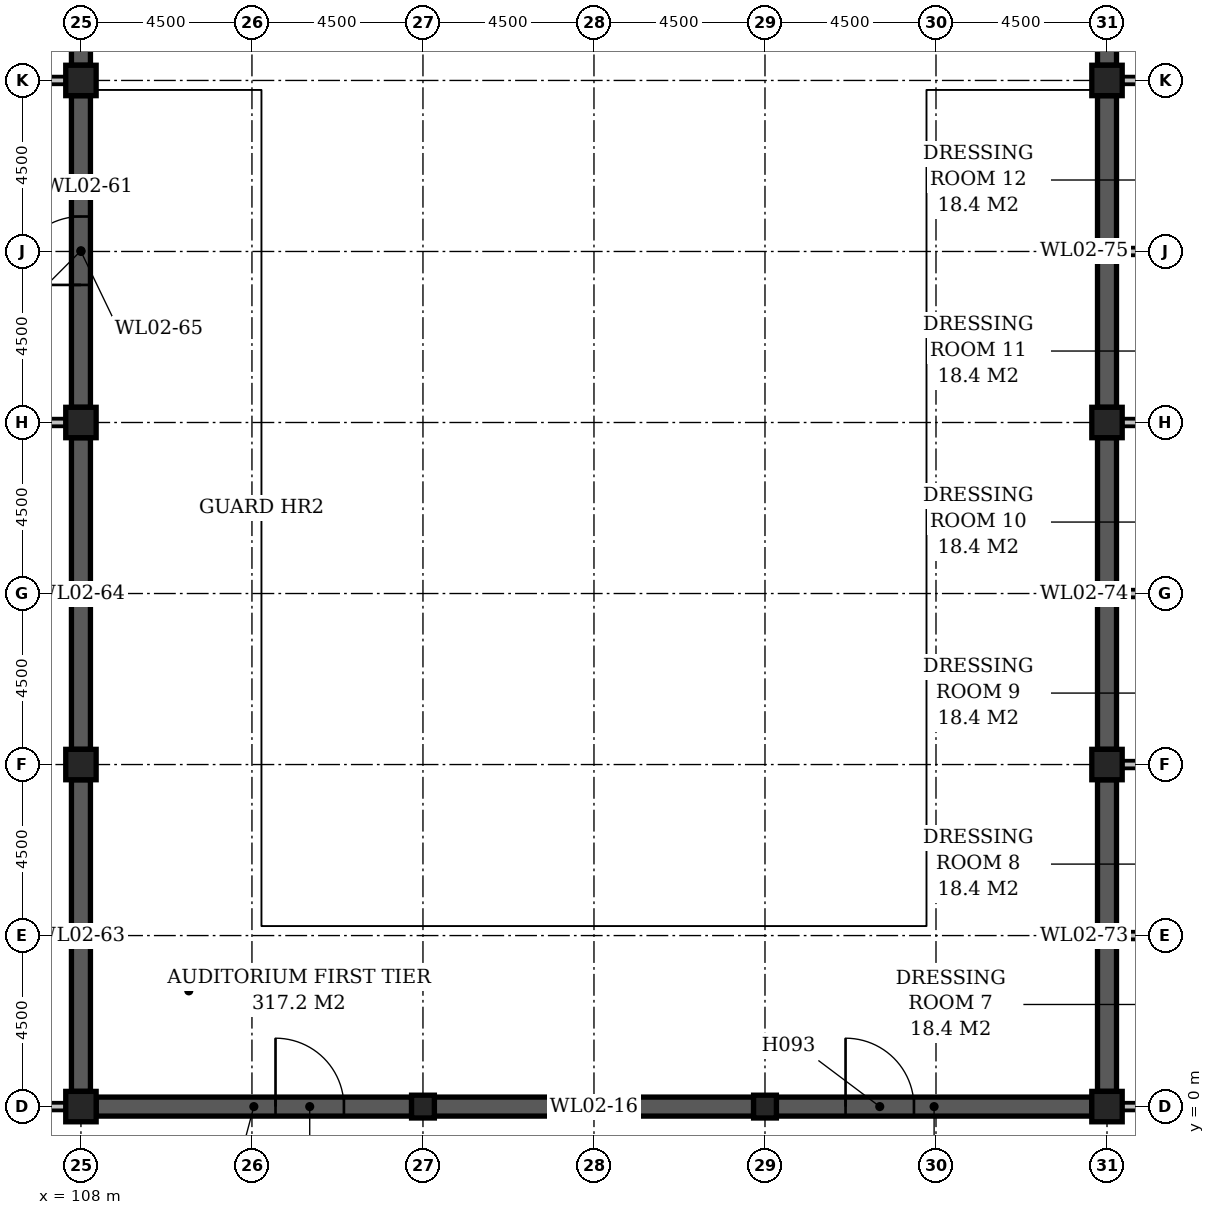
"""IFC4 building model, lengths in metres.
Left out: names, types, materials, properties, quantities, classifications, styles, units other than length and angle.
Written with IfcOpenShell. Run it as: python <this file> out.ifc"""

import sys

from ifc_helpers import new_model, si_unit, direction, frame, frame_2d, origin, origin_2d, place, context, subcontext, project, spatial, rectangle, extrude, element, fill, save


model = new_model("IFC4")
c1 = context("Model", 3, precision=1e-05, world=origin(), true_north=direction((0.0, 1.0)))
c2 = subcontext(c1, "Body", "Model", "MODEL_VIEW")
j1 = project(units=[si_unit("LENGTHUNIT", "METRE"), si_unit("PLANEANGLEUNIT", "RADIAN")], contexts=[c1])
p1 = place(None, origin())
s1 = spatial("IfcSite", under=j1, at=p1, CompositionType="ELEMENT")
p2 = place(p1, origin())
s2 = spatial("IfcBuilding", under=s1, at=p2, CompositionType="ELEMENT")
p3 = place(p2, frame((0.0, 0.0, 14.0)))
s3 = spatial("IfcBuildingStorey", under=s2, at=p3, CompositionType="ELEMENT", Elevation=14.0)
for number, where, z_axis, x_axis in (
    (1, (108.0, 0.0, -0.3), (0.0, 0.0, 1.0), (1.0, 0.0, 0.0)),
    (2, (108.0, 9.0, -0.3), (0.0, 0.0, 1.0), (1.0, 0.0, 0.0)),
    (3, (108.0, 18.0, -0.3), (0.0, 0.0, 1.0), (1.0, 0.0, 0.0)),
    (4, (108.0, 27.0, -0.3), (0.0, 0.0, 1.0), (1.0, 0.0, 0.0)),
):
    element("IfcColumn", number, at=place(p3, frame(where, z_axis=z_axis, x_axis=x_axis)), inside=s3, PredefinedType="COLUMN", context=c2, shape_type="SweptSolid", body=[
        extrude(rectangle(XDim=0.8, YDim=0.8, at=origin_2d()), origin(), (0.0, 0.0, 1.0), 5.0),
    ])
for number, where, z_axis, x_axis in (
    (5, (117.0, 0.0, -0.3), (0.0, 0.0, 1.0), (1.0, 0.0, 0.0)),
    (6, (126.0, 0.0, -0.3), (0.0, 0.0, 1.0), (1.0, 0.0, 0.0)),
):
    element("IfcColumn", number, at=place(p3, frame(where, z_axis=z_axis, x_axis=x_axis)), inside=s3, PredefinedType="COLUMN", context=c2, shape_type="SweptSolid", body=[
        extrude(rectangle(XDim=0.6, YDim=0.6, at=origin_2d()), origin(), (0.0, 0.0, 1.0), 5.0),
    ])
for number, where, z_axis, x_axis in (
    (7, (135.0, 0.0, -0.3), (0.0, 0.0, 1.0), (1.0, 0.0, 0.0)),
    (8, (135.0, 9.0, -0.3), (0.0, 0.0, 1.0), (1.0, 0.0, 0.0)),
    (9, (135.0, 18.0, -0.3), (0.0, 0.0, 1.0), (1.0, 0.0, 0.0)),
    (10, (135.0, 27.0, -0.3), (0.0, 0.0, 1.0), (1.0, 0.0, 0.0)),
):
    element("IfcColumn", number, at=place(p3, frame(where, z_axis=z_axis, x_axis=x_axis)), inside=s3, PredefinedType="COLUMN", context=c2, shape_type="SweptSolid", body=[
        extrude(rectangle(XDim=0.8, YDim=0.8, at=origin_2d()), origin(), (0.0, 0.0, 1.0), 5.0),
    ])
p4 = place(p3, frame((99.3, 0.0, 0.0), z_axis=(0.0, 0.0, 1.0), x_axis=(1.0, 0.0, 0.0)))
e11 = element("IfcWall", 11, at=p4, inside=s3, PredefinedType="STANDARD", context=c2, shape_type="SweptSolid", body=[
    extrude(rectangle(XDim=8.3, YDim=0.2, at=frame_2d((4.15, 0.0))), origin(), (0.0, 0.0, 1.0), 4.7),
])
p5 = place(p3, frame((108.4, 0.0, 0.0), z_axis=(0.0, 0.0, 1.0), x_axis=(1.0, 0.0, 0.0)))
e12 = element("IfcWall", 12, at=p5, inside=s3, PredefinedType="STANDARD", context=c2, shape_type="SweptSolid", body=[
    extrude(rectangle(XDim=8.3, YDim=0.5, at=frame_2d((4.15, 0.0))), origin(), (0.0, 0.0, 1.0), 5.0),
])
p6 = place(p5, frame((4.72, 0.0, 0.0)))
e13 = element("IfcOpeningElement", 13, at=p6, cuts=e12, PredefinedType="OPENING", context=c2, shape_type="SweptSolid", body=[
    extrude(rectangle(XDim=1.8, YDim=2.4, at=frame_2d((0.9, 1.2))), frame((0.0, 0.262, 0.0), z_axis=(0.0, -1.0, 0.0), x_axis=(1.0, 0.0, 0.0)), (0.0, 0.0, 1.0), 0.524),
])
p7 = place(p3, frame((117.3, 0.0, 0.0), z_axis=(0.0, 0.0, 1.0), x_axis=(1.0, 0.0, 0.0)))
e14 = element("IfcWall", 14, at=p7, inside=s3, PredefinedType="STANDARD", context=c2, shape_type="SweptSolid", body=[
    extrude(rectangle(XDim=8.4, YDim=0.5, at=frame_2d((4.2, 0.0))), origin(), (0.0, 0.0, 1.0), 5.0),
])
p8 = place(p3, frame((126.3, 0.0, 0.0), z_axis=(0.0, 0.0, 1.0), x_axis=(1.0, 0.0, 0.0)))
e15 = element("IfcWall", 15, at=p8, inside=s3, PredefinedType="STANDARD", context=c2, shape_type="SweptSolid", body=[
    extrude(rectangle(XDim=8.3, YDim=0.5, at=frame_2d((4.15, 0.0))), origin(), (0.0, 0.0, 1.0), 5.0),
])
p9 = place(p8, frame((1.82, 0.0, 0.0)))
e16 = element("IfcOpeningElement", 16, at=p9, cuts=e15, PredefinedType="OPENING", context=c2, shape_type="SweptSolid", body=[
    extrude(rectangle(XDim=1.8, YDim=2.4, at=frame_2d((0.9, 1.2))), frame((0.0, 0.262, 0.0), z_axis=(0.0, -1.0, 0.0), x_axis=(1.0, 0.0, 0.0)), (0.0, 0.0, 1.0), 0.524),
])
p10 = place(p3, frame((135.4, 0.0, 0.0), z_axis=(0.0, 0.0, 1.0), x_axis=(1.0, 0.0, 0.0)))
e17 = element("IfcWall", 17, at=p10, inside=s3, PredefinedType="STANDARD", context=c2, shape_type="SweptSolid", body=[
    extrude(rectangle(XDim=8.3, YDim=0.2, at=frame_2d((4.15, 0.0))), origin(), (0.0, 0.0, 1.0), 4.7),
])
p11 = place(p10, frame((5.77, 0.0, 0.0)))
e18 = element("IfcOpeningElement", 18, at=p11, cuts=e17, PredefinedType="OPENING", context=c2, shape_type="SweptSolid", body=[
    extrude(rectangle(XDim=1.2, YDim=2.1, at=frame_2d((0.6, 1.05))), frame((0.0, 0.112, 0.0), z_axis=(0.0, -1.0, 0.0), x_axis=(1.0, 0.0, 0.0)), (0.0, 0.0, 1.0), 0.224),
])
p12 = place(p10, frame((1.37, 0.0, 0.0)))
e19 = element("IfcOpeningElement", 19, at=p12, cuts=e17, PredefinedType="OPENING", context=c2, shape_type="SweptSolid", body=[
    extrude(rectangle(XDim=1.0, YDim=2.1, at=frame_2d((0.5, 1.05))), frame((0.0, 0.112, 0.0), z_axis=(0.0, -1.0, 0.0), x_axis=(1.0, 0.0, 0.0)), (0.0, 0.0, 1.0), 0.224),
])
p13 = place(p3, frame((135.25, 4.5, 0.0), z_axis=(0.0, 0.0, 1.0), x_axis=(1.0, 0.0, 0.0)))
e20 = element("IfcWall", 20, at=p13, inside=s3, PredefinedType="STANDARD", context=c2, shape_type="SweptSolid", body=[
    extrude(rectangle(XDim=4.15, YDim=0.2, at=frame_2d((2.075, 0.0))), origin(), (0.0, 0.0, 1.0), 4.7),
])
p14 = place(p3, frame((135.4, 9.0, 0.0), z_axis=(0.0, 0.0, 1.0), x_axis=(1.0, 0.0, 0.0)))
e21 = element("IfcWall", 21, at=p14, inside=s3, PredefinedType="STANDARD", context=c2, shape_type="SweptSolid", body=[
    extrude(rectangle(XDim=4.0, YDim=0.2, at=frame_2d((2.0, 0.0))), origin(), (0.0, 0.0, 1.0), 4.7),
])
p15 = place(p3, frame((135.25, 13.5, 0.0), z_axis=(0.0, 0.0, 1.0), x_axis=(1.0, 0.0, 0.0)))
e22 = element("IfcWall", 22, at=p15, inside=s3, PredefinedType="STANDARD", context=c2, shape_type="SweptSolid", body=[
    extrude(rectangle(XDim=4.15, YDim=0.2, at=frame_2d((2.075, 0.0))), origin(), (0.0, 0.0, 1.0), 4.7),
])
p16 = place(p3, frame((94.5, 18.0, 0.0), z_axis=(0.0, 0.0, 1.0), x_axis=(1.0, 0.0, 0.0)))
e23 = element("IfcWall", 23, at=p16, inside=s3, PredefinedType="STANDARD", context=c2, shape_type="SweptSolid", body=[
    extrude(rectangle(XDim=13.1, YDim=0.2, at=frame_2d((6.55, 0.0))), origin(), (0.0, 0.0, 1.0), 3.3),
])
p17 = place(p16, frame((6.17, 0.0, 0.0)))
e24 = element("IfcOpeningElement", 24, at=p17, cuts=e23, PredefinedType="OPENING", context=c2, shape_type="SweptSolid", body=[
    extrude(rectangle(XDim=1.2, YDim=2.1, at=frame_2d((0.6, 1.05))), frame((0.0, 0.112, 0.0), z_axis=(0.0, -1.0, 0.0), x_axis=(1.0, 0.0, 0.0)), (0.0, 0.0, 1.0), 0.224),
])
p18 = place(p3, frame((135.4, 18.0, 0.0), z_axis=(0.0, 0.0, 1.0), x_axis=(1.0, 0.0, 0.0)))
e25 = element("IfcWall", 25, at=p18, inside=s3, PredefinedType="STANDARD", context=c2, shape_type="SweptSolid", body=[
    extrude(rectangle(XDim=4.0, YDim=0.2, at=frame_2d((2.0, 0.0))), origin(), (0.0, 0.0, 1.0), 4.7),
])
p19 = place(p3, frame((135.25, 22.5, 0.0), z_axis=(0.0, 0.0, 1.0), x_axis=(1.0, 0.0, 0.0)))
e26 = element("IfcWall", 26, at=p19, inside=s3, PredefinedType="STANDARD", context=c2, shape_type="SweptSolid", body=[
    extrude(rectangle(XDim=4.15, YDim=0.2, at=frame_2d((2.075, 0.0))), origin(), (0.0, 0.0, 1.0), 4.7),
])
p20 = place(p3, frame((99.3, 27.0, 0.0), z_axis=(0.0, 0.0, 1.0), x_axis=(1.0, 0.0, 0.0)))
e27 = element("IfcWall", 27, at=p20, inside=s3, PredefinedType="STANDARD", context=c2, shape_type="SweptSolid", body=[
    extrude(rectangle(XDim=8.3, YDim=0.2, at=frame_2d((4.15, 0.0))), origin(), (0.0, 0.0, 1.0), 4.7),
])
p21 = place(p20, frame((1.07, 0.0, 0.0)))
e28 = element("IfcOpeningElement", 28, at=p21, cuts=e27, PredefinedType="OPENING", context=c2, shape_type="SweptSolid", body=[
    extrude(rectangle(XDim=1.8, YDim=2.4, at=frame_2d((0.9, 1.2))), frame((0.0, 0.112, 0.0), z_axis=(0.0, -1.0, 0.0), x_axis=(1.0, 0.0, 0.0)), (0.0, 0.0, 1.0), 0.224),
])
p22 = place(p3, frame((135.4, 27.0, 0.0), z_axis=(0.0, 0.0, 1.0), x_axis=(1.0, 0.0, 0.0)))
e29 = element("IfcWall", 29, at=p22, inside=s3, PredefinedType="STANDARD", context=c2, shape_type="SweptSolid", body=[
    extrude(rectangle(XDim=4.0, YDim=0.2, at=frame_2d((2.0, 0.0))), origin(), (0.0, 0.0, 1.0), 4.7),
])
for number, where, z_axis, x_axis in (
    (30, (108.0, 0.4, 0.0), (0.0, 0.0, 1.0), (0.0, 1.0, 0.0)),
    (31, (108.0, 9.4, 0.0), (0.0, 0.0, 1.0), (0.0, 1.0, 0.0)),
):
    element("IfcWall", number, at=place(p3, frame(where, z_axis=z_axis, x_axis=x_axis)), inside=s3, PredefinedType="STANDARD", context=c2, shape_type="SweptSolid", body=[
        extrude(rectangle(XDim=8.2, YDim=0.5, at=frame_2d((4.1, 0.0))), origin(), (0.0, 0.0, 1.0), 5.0),
    ])
p23 = place(p3, frame((108.0, 18.4, 0.0), z_axis=(0.0, 0.0, 1.0), x_axis=(0.0, 1.0, 0.0)))
e32 = element("IfcWall", 32, at=p23, inside=s3, PredefinedType="STANDARD", context=c2, shape_type="SweptSolid", body=[
    extrude(rectangle(XDim=8.2, YDim=0.5, at=frame_2d((4.1, 0.0))), origin(), (0.0, 0.0, 1.0), 5.0),
])
p24 = place(p23, frame((3.22, 0.0, 0.0)))
e33 = element("IfcOpeningElement", 33, at=p24, cuts=e32, PredefinedType="OPENING", context=c2, shape_type="SweptSolid", body=[
    extrude(rectangle(XDim=1.8, YDim=2.4, at=frame_2d((0.9, 1.2))), frame((0.0, 0.262, 0.0), z_axis=(0.0, -1.0, 0.0), x_axis=(1.0, 0.0, 0.0)), (0.0, 0.0, 1.0), 0.524),
])
p25 = place(p3, frame((108.0, 27.4, 0.0), z_axis=(0.0, 0.0, 1.0), x_axis=(0.0, 1.0, 0.0)))
e34 = element("IfcWall", 34, at=p25, inside=s3, PredefinedType="STANDARD", context=c2, shape_type="SweptSolid", body=[
    extrude(rectangle(XDim=8.3, YDim=0.5, at=frame_2d((4.15, 0.0))), origin(), (0.0, 0.0, 1.0), 5.0),
])
for number, where, z_axis, x_axis in (
    (35, (135.0, 0.4, 0.0), (0.0, 0.0, 1.0), (0.0, 1.0, 0.0)),
    (36, (135.0, 9.4, 0.0), (0.0, 0.0, 1.0), (0.0, 1.0, 0.0)),
    (37, (135.0, 18.4, 0.0), (0.0, 0.0, 1.0), (0.0, 1.0, 0.0)),
):
    element("IfcWall", number, at=place(p3, frame(where, z_axis=z_axis, x_axis=x_axis)), inside=s3, PredefinedType="STANDARD", context=c2, shape_type="SweptSolid", body=[
        extrude(rectangle(XDim=8.2, YDim=0.5, at=frame_2d((4.1, 0.0))), origin(), (0.0, 0.0, 1.0), 5.0),
    ])
p26 = place(p3, frame((135.0, 27.4, 0.0), z_axis=(0.0, 0.0, 1.0), x_axis=(0.0, 1.0, 0.0)))
e38 = element("IfcWall", 38, at=p26, inside=s3, PredefinedType="STANDARD", context=c2, shape_type="SweptSolid", body=[
    extrude(rectangle(XDim=8.3, YDim=0.5, at=frame_2d((4.15, 0.0))), origin(), (0.0, 0.0, 1.0), 5.0),
])
p27 = place(p24, origin())
e39 = element("IfcDoor", 39, at=p27, inside=s3, OperationType="DOUBLE_DOOR_SINGLE_SWING", PredefinedType="DOOR", context=c2, shape_type="SweptSolid", body=[
    extrude(rectangle(XDim=1.8, YDim=2.4, at=frame_2d((0.9, 1.2))), frame((0.0, 0.025, 0.0), z_axis=(0.0, -1.0, 0.0), x_axis=(1.0, 0.0, 0.0)), (0.0, 0.0, 1.0), 0.05),
])
fill(e33, e39)
p28 = place(p6, origin())
e40 = element("IfcDoor", 40, at=p28, inside=s3, OperationType="DOUBLE_DOOR_SINGLE_SWING", PredefinedType="DOOR", context=c2, shape_type="SweptSolid", body=[
    extrude(rectangle(XDim=1.8, YDim=2.4, at=frame_2d((0.9, 1.2))), frame((0.0, 0.025, 0.0), z_axis=(0.0, -1.0, 0.0), x_axis=(1.0, 0.0, 0.0)), (0.0, 0.0, 1.0), 0.05),
])
fill(e13, e40)
p29 = place(p9, origin())
e41 = element("IfcDoor", 41, at=p29, inside=s3, OperationType="DOUBLE_DOOR_SINGLE_SWING", PredefinedType="DOOR", context=c2, shape_type="SweptSolid", body=[
    extrude(rectangle(XDim=1.8, YDim=2.4, at=frame_2d((0.9, 1.2))), frame((0.0, 0.025, 0.0), z_axis=(0.0, -1.0, 0.0), x_axis=(1.0, 0.0, 0.0)), (0.0, 0.0, 1.0), 0.05),
])
fill(e16, e41)
save(model, sys.argv[1])
